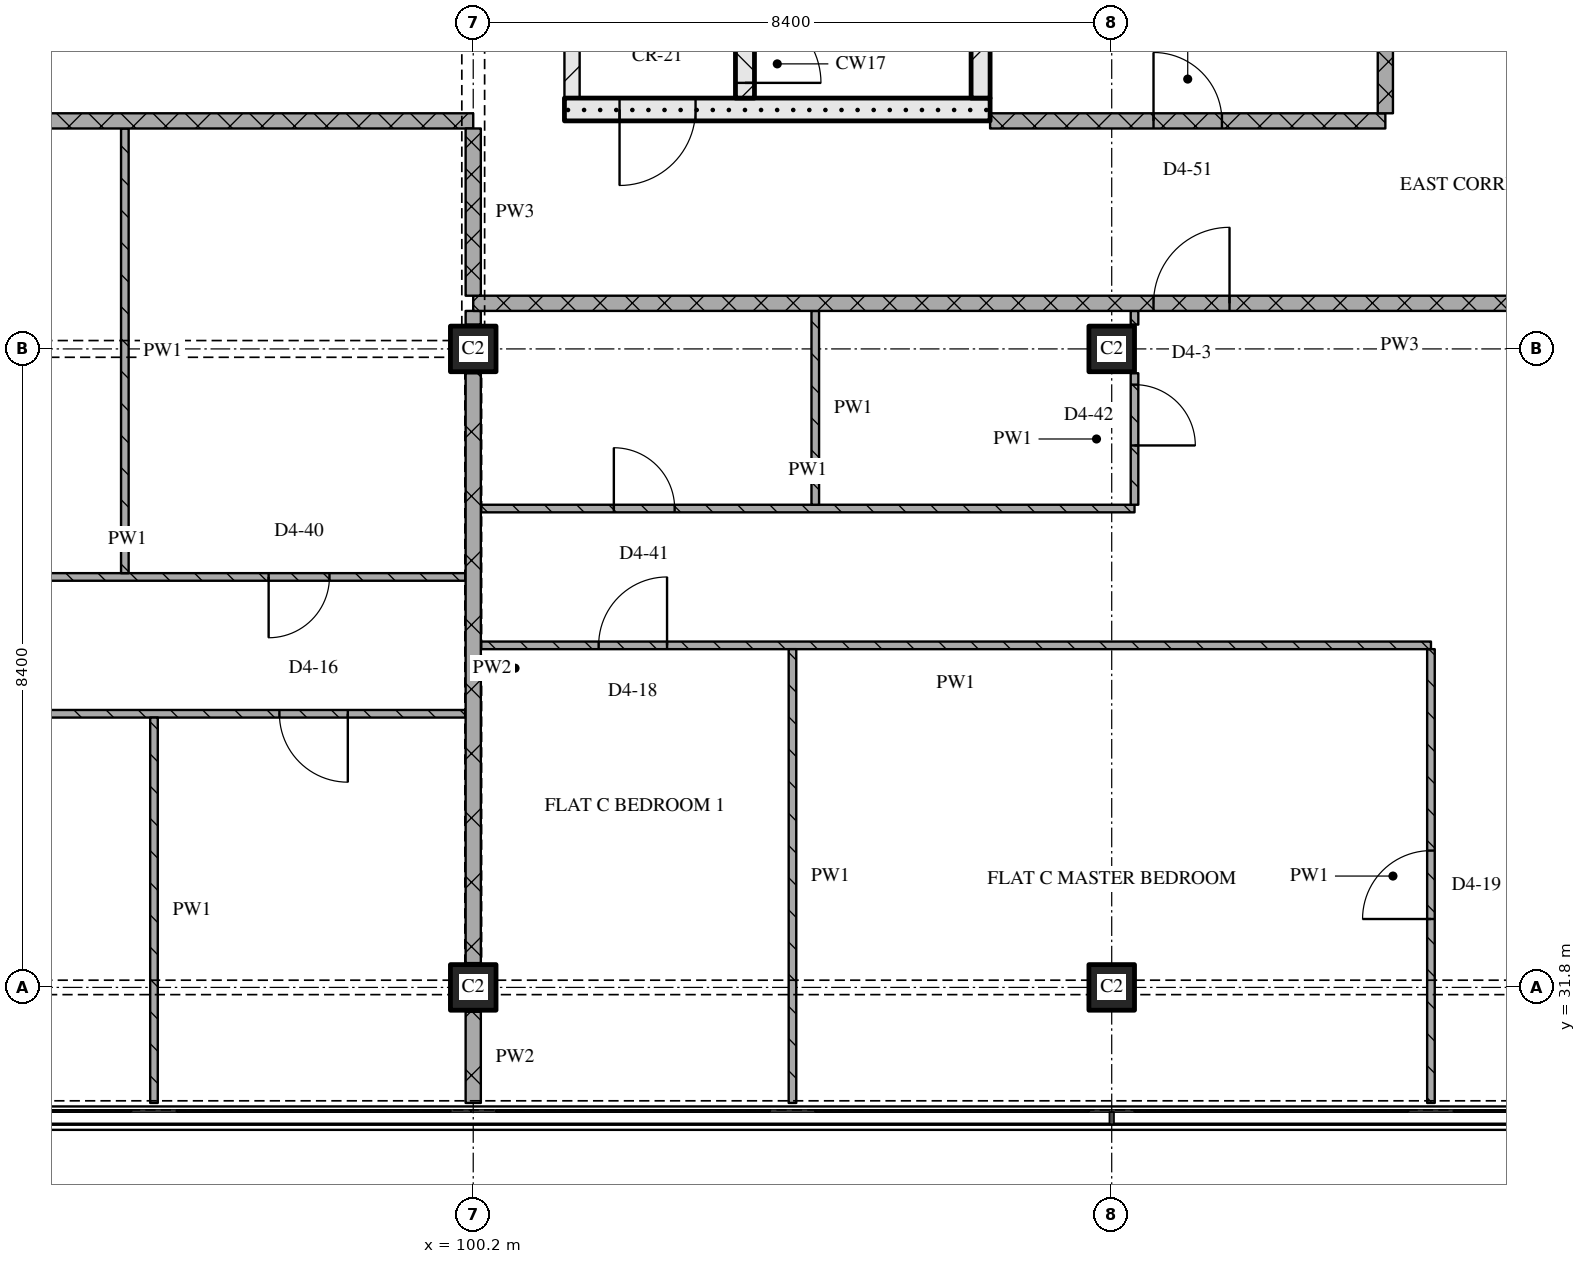
"""IFC4 building model, lengths in metres.
Left out: names, types, materials, properties, quantities, classifications, styles, units other than length and angle.
Written with IfcOpenShell. Run it as: python <this file> out.ifc"""

import sys

from ifc_helpers import new_model, si_unit, direction, frame, frame_2d, origin, origin_2d, place, context, subcontext, project, spatial, rectangle, extrude, element, fill, save


model = new_model("IFC4")
c1 = context("Model", 3, precision=1e-05, world=origin(), true_north=direction((0.0, 1.0)))
c2 = subcontext(c1, "Body", "Model", "MODEL_VIEW")
j1 = project(units=[si_unit("LENGTHUNIT", "METRE"), si_unit("PLANEANGLEUNIT", "RADIAN")], contexts=[c1])
p1 = place(None, origin())
s1 = spatial("IfcSite", under=j1, at=p1, CompositionType="ELEMENT")
p2 = place(p1, origin())
s2 = spatial("IfcBuilding", under=s1, at=p2, CompositionType="ELEMENT")
p3 = place(p2, frame((0.0, 0.0, 237.9)))
s3 = spatial("IfcBuildingStorey", under=s2, at=p3, CompositionType="ELEMENT", Elevation=237.9)
for number, where, z_axis, x_axis in (
    (1, (100.2, 31.8, 0.0), (0.0, 0.0, 1.0), (1.0, 0.0, 0.0)),
    (2, (100.2, 40.2, 0.0), (0.0, 0.0, 1.0), (1.0, 0.0, 0.0)),
    (3, (108.6, 31.8, 0.0), (0.0, 0.0, 1.0), (1.0, 0.0, 0.0)),
    (4, (108.6, 40.2, 0.0), (0.0, 0.0, 1.0), (1.0, 0.0, 0.0)),
):
    element("IfcColumn", number, at=place(p3, frame(where, z_axis=z_axis, x_axis=x_axis)), inside=s3, PredefinedType="COLUMN", context=c2, shape_type="SweptSolid", body=[
        extrude(rectangle(XDim=0.6, YDim=0.6, at=origin_2d()), origin(), (0.0, 0.0, 1.0), 3.6),
    ])
p4 = place(p3, frame((101.4, 43.35, 0.0), z_axis=(0.0, 0.0, 1.0), x_axis=(1.0, 0.0, 0.0)))
e5 = element("IfcWall", 5, at=p4, inside=s3, PredefinedType="SOLIDWALL", context=c2, shape_type="SweptSolid", body=[
    extrude(rectangle(XDim=5.6, YDim=0.3, at=frame_2d((2.8, 0.0))), origin(), (0.0, 0.0, 1.0), 3.32),
])
p5 = place(p4, frame((0.725, 0.0, 0.0)))
e6 = element("IfcOpeningElement", 6, at=p5, cuts=e5, PredefinedType="OPENING", context=c2, shape_type="SweptSolid", body=[
    extrude(rectangle(XDim=1.0, YDim=2.1, at=frame_2d((0.5, 1.05))), frame((0.0, 0.16, 0.0), z_axis=(0.0, -1.0, 0.0), x_axis=(1.0, 0.0, 0.0)), (0.0, 0.0, 1.0), 0.32),
])
p6 = place(p3, frame((101.5, 43.5, 0.0), z_axis=(0.0, 0.0, 1.0), x_axis=(0.0, 1.0, 0.0)))
e7 = element("IfcWall", 7, at=p6, inside=s3, PredefinedType="PARTITIONING", context=c2, shape_type="SweptSolid", body=[
    extrude(rectangle(XDim=6.9, YDim=0.2, at=frame_2d((3.45, 0.0))), origin(), (0.0, 0.0, 1.0), 3.32),
])
p7 = place(p6, frame((1.0, 0.0, 0.0)))
e8 = element("IfcOpeningElement", 8, at=p7, cuts=e7, PredefinedType="OPENING", context=c2, shape_type="SweptSolid", body=[
    extrude(rectangle(XDim=1.0, YDim=2.1, at=frame_2d((0.5, 1.05))), frame((0.0, 0.11, 0.0), z_axis=(0.0, -1.0, 0.0), x_axis=(1.0, 0.0, 0.0)), (0.0, 0.0, 1.0), 0.22),
])
p8 = place(p3, frame((103.775, 43.5, 0.0), z_axis=(0.0, 0.0, 1.0), x_axis=(0.0, 1.0, 0.0)))
e9 = element("IfcWall", 9, at=p8, inside=s3, PredefinedType="SOLIDWALL", context=c2, shape_type="SweptSolid", body=[
    extrude(rectangle(XDim=6.9, YDim=0.25, at=frame_2d((3.45, 0.0))), origin(), (0.0, 0.0, 1.0), 3.32),
])
p9 = place(p8, frame((0.2, 0.0, 0.0)))
e10 = element("IfcOpeningElement", 10, at=p9, cuts=e9, PredefinedType="OPENING", context=c2, shape_type="SweptSolid", body=[
    extrude(rectangle(XDim=1.0, YDim=2.1, at=frame_2d((0.5, 1.05))), frame((0.0, 0.135, 0.0), z_axis=(0.0, -1.0, 0.0), x_axis=(1.0, 0.0, 0.0)), (0.0, 0.0, 1.0), 0.27),
])
p10 = place(p3, frame((106.875, 43.5, 0.0), z_axis=(0.0, 0.0, 1.0), x_axis=(0.0, 1.0, 0.0)))
e11 = element("IfcWall", 11, at=p10, inside=s3, PredefinedType="SOLIDWALL", context=c2, shape_type="SweptSolid", body=[
    extrude(rectangle(XDim=6.9, YDim=0.25, at=frame_2d((3.45, 0.0))), origin(), (0.0, 0.0, 1.0), 3.32),
])
p11 = place(p3, frame((100.1, 35.4, 0.0), z_axis=(0.0, 0.0, 1.0), x_axis=(-1.0, 0.0, 0.0)))
e12 = element("IfcWall", 12, at=p11, inside=s3, PredefinedType="PARTITIONING", context=c2, shape_type="SweptSolid", body=[
    extrude(rectangle(XDim=20.9, YDim=0.1, at=frame_2d((10.45, 0.0))), origin(), (0.0, 0.0, 1.0), 3.32),
])
p12 = place(p11, frame((1.55, 0.0, 0.0)))
e13 = element("IfcOpeningElement", 13, at=p12, cuts=e12, PredefinedType="OPENING", context=c2, shape_type="SweptSolid", body=[
    extrude(rectangle(XDim=0.9, YDim=2.1, at=frame_2d((0.45, 1.05))), frame((0.0, 0.06, 0.0), z_axis=(0.0, -1.0, 0.0), x_axis=(1.0, 0.0, 0.0)), (0.0, 0.0, 1.0), 0.12),
])
p13 = place(p11, frame((7.85, 0.0, 0.0)))
e14 = element("IfcOpeningElement", 14, at=p13, cuts=e12, PredefinedType="OPENING", context=c2, shape_type="SweptSolid", body=[
    extrude(rectangle(XDim=0.9, YDim=2.1, at=frame_2d((0.45, 1.05))), frame((0.0, 0.06, 0.0), z_axis=(0.0, -1.0, 0.0), x_axis=(1.0, 0.0, 0.0)), (0.0, 0.0, 1.0), 0.12),
])
p14 = place(p11, frame((16.25, 0.0, 0.0)))
e15 = element("IfcOpeningElement", 15, at=p14, cuts=e12, PredefinedType="OPENING", context=c2, shape_type="SweptSolid", body=[
    extrude(rectangle(XDim=0.9, YDim=2.1, at=frame_2d((0.45, 1.05))), frame((0.0, 0.06, 0.0), z_axis=(0.0, -1.0, 0.0), x_axis=(1.0, 0.0, 0.0)), (0.0, 0.0, 1.0), 0.12),
])
p15 = place(p3, frame((112.8, 36.3, 0.0), z_axis=(0.0, 0.0, 1.0), x_axis=(-1.0, 0.0, 0.0)))
e16 = element("IfcWall", 16, at=p15, inside=s3, PredefinedType="PARTITIONING", context=c2, shape_type="SweptSolid", body=[
    extrude(rectangle(XDim=12.5, YDim=0.1, at=frame_2d((6.25, 0.0))), origin(), (0.0, 0.0, 1.0), 3.32),
])
p16 = place(p15, frame((10.05, 0.0, 0.0)))
e17 = element("IfcOpeningElement", 17, at=p16, cuts=e16, PredefinedType="OPENING", context=c2, shape_type="SweptSolid", body=[
    extrude(rectangle(XDim=0.9, YDim=2.1, at=frame_2d((0.45, 1.05))), frame((0.0, 0.06, 0.0), z_axis=(0.0, -1.0, 0.0), x_axis=(1.0, 0.0, 0.0)), (0.0, 0.0, 1.0), 0.12),
])
p17 = place(p3, frame((91.2, 37.2, 0.0), z_axis=(0.0, 0.0, 1.0), x_axis=(1.0, 0.0, 0.0)))
e18 = element("IfcWall", 18, at=p17, inside=s3, PredefinedType="PARTITIONING", context=c2, shape_type="SweptSolid", body=[
    extrude(rectangle(XDim=8.9, YDim=0.1, at=frame_2d((4.45, 0.0))), origin(), (0.0, 0.0, 1.0), 3.32),
])
p18 = place(p17, frame((6.308, 0.0, 0.0)))
e19 = element("IfcOpeningElement", 19, at=p18, cuts=e18, PredefinedType="OPENING", context=c2, shape_type="SweptSolid", body=[
    extrude(rectangle(XDim=0.8, YDim=2.1, at=frame_2d((0.4, 1.05))), frame((0.0, 0.06, 0.0), z_axis=(0.0, -1.0, 0.0), x_axis=(1.0, 0.0, 0.0)), (0.0, 0.0, 1.0), 0.12),
])
p19 = place(p3, frame((100.3, 38.1, 0.0), z_axis=(0.0, 0.0, 1.0), x_axis=(1.0, 0.0, 0.0)))
e20 = element("IfcWall", 20, at=p19, inside=s3, PredefinedType="PARTITIONING", context=c2, shape_type="SweptSolid", body=[
    extrude(rectangle(XDim=8.6, YDim=0.1, at=frame_2d((4.3, 0.0))), origin(), (0.0, 0.0, 1.0), 3.32),
])
p20 = place(p19, frame((1.75, 0.0, 0.0)))
e21 = element("IfcOpeningElement", 21, at=p20, cuts=e20, PredefinedType="OPENING", context=c2, shape_type="SweptSolid", body=[
    extrude(rectangle(XDim=0.8, YDim=2.1, at=frame_2d((0.4, 1.05))), frame((0.0, 0.06, 0.0), z_axis=(0.0, -1.0, 0.0), x_axis=(1.0, 0.0, 0.0)), (0.0, 0.0, 1.0), 0.12),
])
p21 = place(p3, frame((124.58, 40.8, 0.0), z_axis=(0.0, 0.0, 1.0), x_axis=(-1.0, 0.0, 0.0)))
e22 = element("IfcWall", 22, at=p21, inside=s3, PredefinedType="PARTITIONING", context=c2, shape_type="SweptSolid", body=[
    extrude(rectangle(XDim=24.38, YDim=0.2, at=frame_2d((12.19, 0.0))), origin(), (0.0, 0.0, 1.0), 3.32),
])
p22 = place(p21, frame((14.43, 0.0, 0.0)))
e23 = element("IfcOpeningElement", 23, at=p22, cuts=e22, PredefinedType="OPENING", context=c2, shape_type="SweptSolid", body=[
    extrude(rectangle(XDim=1.0, YDim=2.1, at=frame_2d((0.5, 1.05))), frame((0.0, 0.11, 0.0), z_axis=(0.0, -1.0, 0.0), x_axis=(1.0, 0.0, 0.0)), (0.0, 0.0, 1.0), 0.22),
])
p23 = place(p3, frame((100.2, 43.2, 0.0), z_axis=(0.0, 0.0, 1.0), x_axis=(-1.0, 0.0, 0.0)))
e24 = element("IfcWall", 24, at=p23, inside=s3, PredefinedType="PARTITIONING", context=c2, shape_type="SweptSolid", body=[
    extrude(rectangle(XDim=25.2, YDim=0.2, at=frame_2d((12.6, 0.0))), origin(), (0.0, 0.0, 1.0), 3.32),
])
p24 = place(p23, frame((9.25, 0.0, 0.0)))
e25 = element("IfcOpeningElement", 25, at=p24, cuts=e24, PredefinedType="OPENING", context=c2, shape_type="SweptSolid", body=[
    extrude(rectangle(XDim=1.0, YDim=2.1, at=frame_2d((0.5, 1.05))), frame((0.0, 0.11, 0.0), z_axis=(0.0, -1.0, 0.0), x_axis=(1.0, 0.0, 0.0)), (0.0, 0.0, 1.0), 0.22),
])
p25 = place(p3, frame((107.0, 43.2, 0.0), z_axis=(0.0, 0.0, 1.0), x_axis=(1.0, 0.0, 0.0)))
e26 = element("IfcWall", 26, at=p25, inside=s3, PredefinedType="PARTITIONING", context=c2, shape_type="SweptSolid", body=[
    extrude(rectangle(XDim=5.2, YDim=0.2, at=frame_2d((2.6, 0.0))), origin(), (0.0, 0.0, 1.0), 3.32),
])
p26 = place(p25, frame((2.15, 0.0, 0.0)))
e27 = element("IfcOpeningElement", 27, at=p26, cuts=e26, PredefinedType="OPENING", context=c2, shape_type="SweptSolid", body=[
    extrude(rectangle(XDim=0.9, YDim=2.1, at=frame_2d((0.45, 1.05))), frame((0.0, 0.11, 0.0), z_axis=(0.0, -1.0, 0.0), x_axis=(1.0, 0.0, 0.0)), (0.0, 0.0, 1.0), 0.22),
])
p27 = place(p3, frame((95.617, 43.1, 0.0), z_axis=(0.0, 0.0, 1.0), x_axis=(0.0, -1.0, 0.0)))
e28 = element("IfcWall", 28, at=p27, inside=s3, PredefinedType="PARTITIONING", context=c2, shape_type="SweptSolid", body=[
    extrude(rectangle(XDim=5.85, YDim=0.1, at=frame_2d((2.925, 0.0))), origin(), (0.0, 0.0, 1.0), 3.32),
])
p28 = place(p3, frame((96.0, 35.35, 0.0), z_axis=(0.0, 0.0, 1.0), x_axis=(0.0, -1.0, 0.0)))
e29 = element("IfcWall", 29, at=p28, inside=s3, PredefinedType="PARTITIONING", context=c2, shape_type="SweptSolid", body=[
    extrude(rectangle(XDim=5.07, YDim=0.1, at=frame_2d((2.535, 0.0))), origin(), (0.0, 0.0, 1.0), 3.32),
])
p29 = place(p3, frame((100.2, 43.1, 0.0), z_axis=(0.0, 0.0, 1.0), x_axis=(0.0, -1.0, 0.0)))
e30 = element("IfcWall", 30, at=p29, inside=s3, PredefinedType="PARTITIONING", context=c2, shape_type="SweptSolid", body=[
    extrude(rectangle(XDim=2.2, YDim=0.2, at=frame_2d((1.1, 0.0))), origin(), (0.0, 0.0, 1.0), 2.53),
])
p30 = place(p3, frame((100.2, 31.48, 0.0), z_axis=(0.0, 0.0, 1.0), x_axis=(0.0, -1.0, 0.0)))
e31 = element("IfcWall", 31, at=p30, inside=s3, PredefinedType="PARTITIONING", context=c2, shape_type="SweptSolid", body=[
    extrude(rectangle(XDim=1.2, YDim=0.2, at=frame_2d((0.6, 0.0))), origin(), (0.0, 0.0, 1.0), 3.32),
])
p31 = place(p3, frame((100.2, 39.88, 0.0), z_axis=(0.0, 0.0, 1.0), x_axis=(0.0, -1.0, 0.0)))
e32 = element("IfcWall", 32, at=p31, inside=s3, PredefinedType="PARTITIONING", context=c2, shape_type="SweptSolid", body=[
    extrude(rectangle(XDim=7.76, YDim=0.2, at=frame_2d((3.88, 0.0))), origin(), (0.0, 0.0, 1.0), 2.72),
])
p32 = place(p3, frame((100.2, 40.7, 0.0), z_axis=(0.0, 0.0, 1.0), x_axis=(0.0, -1.0, 0.0)))
e33 = element("IfcWall", 33, at=p32, inside=s3, PredefinedType="PARTITIONING", context=c2, shape_type="SweptSolid", body=[
    extrude(rectangle(XDim=0.18, YDim=0.2, at=frame_2d((0.09, 0.0))), origin(), (0.0, 0.0, 1.0), 3.32),
])
p33 = place(p3, frame((104.4, 36.25, 0.0), z_axis=(0.0, 0.0, 1.0), x_axis=(0.0, -1.0, 0.0)))
e34 = element("IfcWall", 34, at=p33, inside=s3, PredefinedType="PARTITIONING", context=c2, shape_type="SweptSolid", body=[
    extrude(rectangle(XDim=5.97, YDim=0.1, at=frame_2d((2.985, 0.0))), origin(), (0.0, 0.0, 1.0), 3.32),
])
p34 = place(p3, frame((104.7, 40.7, 0.0), z_axis=(0.0, 0.0, 1.0), x_axis=(0.0, -1.0, 0.0)))
e35 = element("IfcWall", 35, at=p34, inside=s3, PredefinedType="PARTITIONING", context=c2, shape_type="SweptSolid", body=[
    extrude(rectangle(XDim=2.55, YDim=0.1, at=frame_2d((1.275, 0.0))), origin(), (0.0, 0.0, 1.0), 3.32),
])
p35 = place(p3, frame((108.9, 38.15, 0.0), z_axis=(0.0, 0.0, 1.0), x_axis=(0.0, 1.0, 0.0)))
e36 = element("IfcWall", 36, at=p35, inside=s3, PredefinedType="PARTITIONING", context=c2, shape_type="SweptSolid", body=[
    extrude(rectangle(XDim=1.73, YDim=0.1, at=frame_2d((0.865, 0.0))), origin(), (0.0, 0.0, 1.0), 3.32),
])
p36 = place(p35, frame((0.78, 0.0, 0.0)))
e37 = element("IfcOpeningElement", 37, at=p36, cuts=e36, PredefinedType="OPENING", context=c2, shape_type="SweptSolid", body=[
    extrude(rectangle(XDim=0.8, YDim=2.1, at=frame_2d((0.4, 1.05))), frame((0.0, 0.06, 0.0), z_axis=(0.0, -1.0, 0.0), x_axis=(1.0, 0.0, 0.0)), (0.0, 0.0, 1.0), 0.12),
])
p37 = place(p3, frame((108.9, 40.7, 0.0), z_axis=(0.0, 0.0, 1.0), x_axis=(0.0, -1.0, 0.0)))
e38 = element("IfcWall", 38, at=p37, inside=s3, PredefinedType="PARTITIONING", context=c2, shape_type="SweptSolid", body=[
    extrude(rectangle(XDim=0.18, YDim=0.1, at=frame_2d((0.09, 0.0))), origin(), (0.0, 0.0, 1.0), 3.32),
])
p38 = place(p3, frame((112.2, 43.3, 0.0), z_axis=(0.0, 0.0, 1.0), x_axis=(0.0, 1.0, 0.0)))
e39 = element("IfcWall", 39, at=p38, inside=s3, PredefinedType="PARTITIONING", context=c2, shape_type="SweptSolid", body=[
    extrude(rectangle(XDim=15.4, YDim=0.2, at=frame_2d((7.7, 0.0))), origin(), (0.0, 0.0, 1.0), 3.32),
])
p39 = place(p38, frame((10.95, 0.0, 0.0)))
e40 = element("IfcOpeningElement", 40, at=p39, cuts=e39, PredefinedType="OPENING", context=c2, shape_type="SweptSolid", body=[
    extrude(rectangle(XDim=1.0, YDim=2.1, at=frame_2d((0.5, 1.05))), frame((0.0, 0.11, 0.0), z_axis=(0.0, -1.0, 0.0), x_axis=(1.0, 0.0, 0.0)), (0.0, 0.0, 1.0), 0.22),
])
p40 = place(p3, frame((112.8, 30.28, 0.0), z_axis=(0.0, 0.0, 1.0), x_axis=(0.0, 1.0, 0.0)))
e41 = element("IfcWall", 41, at=p40, inside=s3, PredefinedType="PARTITIONING", context=c2, shape_type="SweptSolid", body=[
    extrude(rectangle(XDim=5.97, YDim=0.1, at=frame_2d((2.985, 0.0))), origin(), (0.0, 0.0, 1.0), 3.32),
])
p41 = place(p40, frame((2.42, 0.0, 0.0)))
e42 = element("IfcOpeningElement", 42, at=p41, cuts=e41, PredefinedType="OPENING", context=c2, shape_type="SweptSolid", body=[
    extrude(rectangle(XDim=0.9, YDim=2.1, at=frame_2d((0.45, 1.05))), frame((0.0, 0.06, 0.0), z_axis=(0.0, -1.0, 0.0), x_axis=(1.0, 0.0, 0.0)), (0.0, 0.0, 1.0), 0.12),
])
p42 = place(p5, origin())
e43 = element("IfcDoor", 43, at=p42, inside=s3, OperationType="SINGLE_SWING_RIGHT", PredefinedType="DOOR", context=c2, shape_type="SweptSolid", body=[
    extrude(rectangle(XDim=1.0, YDim=2.1, at=frame_2d((0.5, 1.05))), frame((0.0, 0.025, 0.0), z_axis=(0.0, -1.0, 0.0), x_axis=(1.0, 0.0, 0.0)), (0.0, 0.0, 1.0), 0.05),
])
fill(e6, e43)
p43 = place(p9, origin())
e44 = element("IfcDoor", 44, at=p43, inside=s3, OperationType="SINGLE_SWING_RIGHT", PredefinedType="DOOR", context=c2, shape_type="SweptSolid", body=[
    extrude(rectangle(XDim=1.0, YDim=2.1, at=frame_2d((0.5, 1.05))), frame((0.0, 0.025, 0.0), z_axis=(0.0, -1.0, 0.0), x_axis=(1.0, 0.0, 0.0)), (0.0, 0.0, 1.0), 0.05),
])
fill(e10, e44)
p44 = place(p12, origin())
e45 = element("IfcDoor", 45, at=p44, inside=s3, OperationType="SINGLE_SWING_LEFT", PredefinedType="DOOR", context=c2, shape_type="SweptSolid", body=[
    extrude(rectangle(XDim=0.9, YDim=2.1, at=frame_2d((0.45, 1.05))), frame((0.0, 0.025, 0.0), z_axis=(0.0, -1.0, 0.0), x_axis=(1.0, 0.0, 0.0)), (0.0, 0.0, 1.0), 0.05),
])
fill(e13, e45)
p45 = place(p16, origin())
e46 = element("IfcDoor", 46, at=p45, inside=s3, OperationType="SINGLE_SWING_RIGHT", PredefinedType="DOOR", context=c2, shape_type="SweptSolid", body=[
    extrude(rectangle(XDim=0.9, YDim=2.1, at=frame_2d((0.45, 1.05))), frame((0.0, 0.025, 0.0), z_axis=(0.0, -1.0, 0.0), x_axis=(1.0, 0.0, 0.0)), (0.0, 0.0, 1.0), 0.05),
])
fill(e17, e46)
p46 = place(p18, origin())
e47 = element("IfcDoor", 47, at=p46, inside=s3, OperationType="SINGLE_SWING_RIGHT", PredefinedType="DOOR", context=c2, shape_type="SweptSolid", body=[
    extrude(rectangle(XDim=0.8, YDim=2.1, at=frame_2d((0.4, 1.05))), frame((0.0, 0.025, 0.0), z_axis=(0.0, -1.0, 0.0), x_axis=(1.0, 0.0, 0.0)), (0.0, 0.0, 1.0), 0.05),
])
fill(e19, e47)
p47 = place(p20, origin())
e48 = element("IfcDoor", 48, at=p47, inside=s3, OperationType="SINGLE_SWING_LEFT", PredefinedType="DOOR", context=c2, shape_type="SweptSolid", body=[
    extrude(rectangle(XDim=0.8, YDim=2.1, at=frame_2d((0.4, 1.05))), frame((0.0, 0.025, 0.0), z_axis=(0.0, -1.0, 0.0), x_axis=(1.0, 0.0, 0.0)), (0.0, 0.0, 1.0), 0.05),
])
fill(e21, e48)
p48 = place(p22, origin())
e49 = element("IfcDoor", 49, at=p48, inside=s3, OperationType="SINGLE_SWING_RIGHT", PredefinedType="DOOR", context=c2, shape_type="SweptSolid", body=[
    extrude(rectangle(XDim=1.0, YDim=2.1, at=frame_2d((0.5, 1.05))), frame((0.0, 0.025, 0.0), z_axis=(0.0, -1.0, 0.0), x_axis=(1.0, 0.0, 0.0)), (0.0, 0.0, 1.0), 0.05),
])
fill(e23, e49)
p49 = place(p26, origin())
e50 = element("IfcDoor", 50, at=p49, inside=s3, OperationType="SINGLE_SWING_LEFT", PredefinedType="DOOR", context=c2, shape_type="SweptSolid", body=[
    extrude(rectangle(XDim=0.9, YDim=2.1, at=frame_2d((0.45, 1.05))), frame((0.0, 0.025, 0.0), z_axis=(0.0, -1.0, 0.0), x_axis=(1.0, 0.0, 0.0)), (0.0, 0.0, 1.0), 0.05),
])
fill(e27, e50)
p50 = place(p36, origin())
e51 = element("IfcDoor", 51, at=p50, inside=s3, OperationType="SINGLE_SWING_RIGHT", PredefinedType="DOOR", context=c2, shape_type="SweptSolid", body=[
    extrude(rectangle(XDim=0.8, YDim=2.1, at=frame_2d((0.4, 1.05))), frame((0.0, 0.025, 0.0), z_axis=(0.0, -1.0, 0.0), x_axis=(1.0, 0.0, 0.0)), (0.0, 0.0, 1.0), 0.05),
])
fill(e37, e51)
p51 = place(p41, origin())
e52 = element("IfcDoor", 52, at=p51, inside=s3, OperationType="SINGLE_SWING_LEFT", PredefinedType="DOOR", context=c2, shape_type="SweptSolid", body=[
    extrude(rectangle(XDim=0.9, YDim=2.1, at=frame_2d((0.45, 1.05))), frame((0.0, 0.025, 0.0), z_axis=(0.0, -1.0, 0.0), x_axis=(1.0, 0.0, 0.0)), (0.0, 0.0, 1.0), 0.05),
])
fill(e42, e52)
save(model, sys.argv[1])
